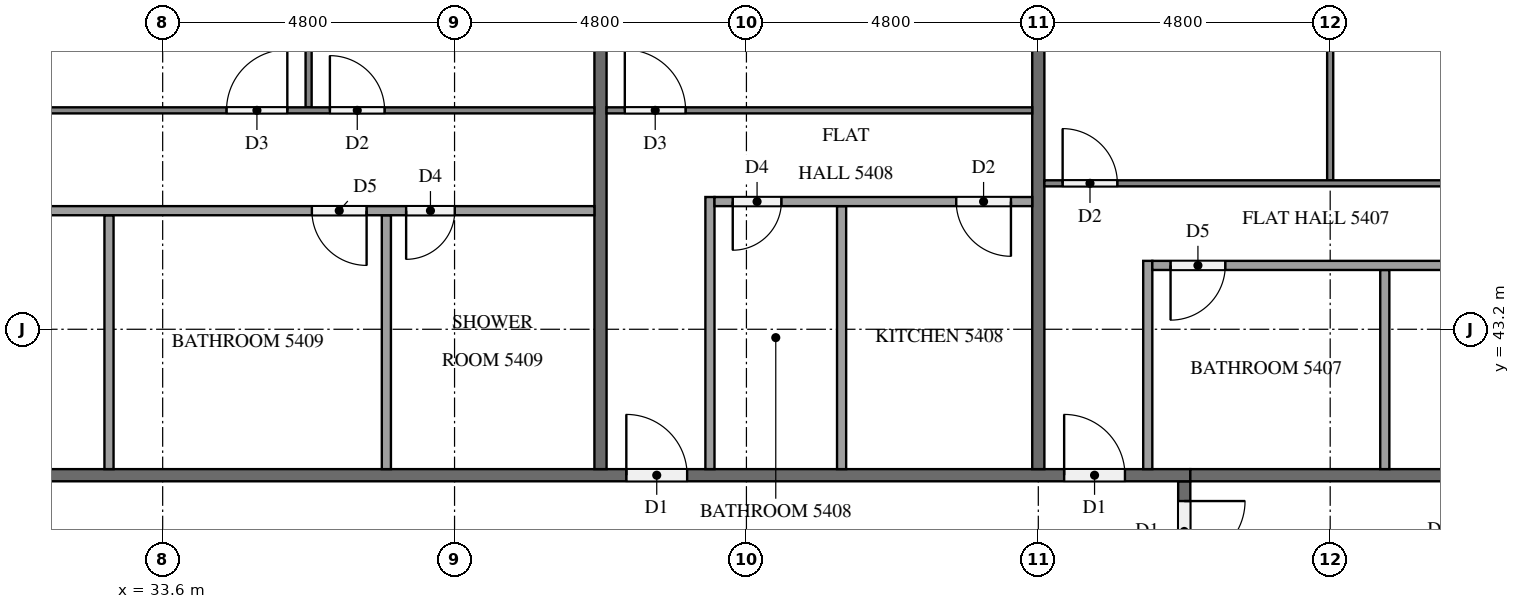
"""IFC4 building model, lengths in metres.
Left out: names, types, materials, properties, quantities, classifications, styles, units other than length and angle.
Written with IfcOpenShell. Run it as: python <this file> out.ifc"""

import sys

from ifc_helpers import new_model, si_unit, direction, frame, frame_2d, origin, place, context, subcontext, project, spatial, rectangle, extrude, element, fill, save


model = new_model("IFC4")
c1 = context("Model", 3, precision=1e-05, world=origin(), true_north=direction((0.0, 1.0)))
c2 = subcontext(c1, "Body", "Model", "MODEL_VIEW")
j1 = project(units=[si_unit("LENGTHUNIT", "METRE"), si_unit("PLANEANGLEUNIT", "RADIAN")], contexts=[c1])
p1 = place(None, origin())
s1 = spatial("IfcSite", under=j1, at=p1, CompositionType="ELEMENT")
p2 = place(p1, origin())
s2 = spatial("IfcBuilding", under=s1, at=p2, CompositionType="ELEMENT")
p3 = place(p2, frame((0.0, 0.0, 208.8)))
s3 = spatial("IfcBuildingStorey", under=s2, at=p3, CompositionType="ELEMENT", Elevation=208.8)
p4 = place(p3, frame((50.4, 40.7, 0.0), z_axis=(0.0, 0.0, 1.0), x_axis=(0.0, -1.0, 0.0)))
e1 = element("IfcWall", 1, at=p4, inside=s3, PredefinedType="PARTITIONING", context=c2, shape_type="SweptSolid", body=[
    extrude(rectangle(XDim=28.6, YDim=0.2, at=frame_2d((14.3, 0.0))), origin(), (0.0, 0.0, 1.0), 3.2),
])
p5 = place(p4, frame((19.525, 0.0, 0.0)))
e2 = element("IfcOpeningElement", 2, at=p5, cuts=e1, PredefinedType="OPENING", context=c2, shape_type="SweptSolid", body=[
    extrude(rectangle(XDim=1.0, YDim=2.1, at=frame_2d((0.5, 1.05))), frame((0.0, 0.11, 0.0), z_axis=(0.0, -1.0, 0.0), x_axis=(1.0, 0.0, 0.0)), (0.0, 0.0, 1.0), 0.22),
])
p6 = place(p4, frame((7.525, 0.0, 0.0)))
e3 = element("IfcOpeningElement", 3, at=p6, cuts=e1, PredefinedType="OPENING", context=c2, shape_type="SweptSolid", body=[
    extrude(rectangle(XDim=1.0, YDim=2.1, at=frame_2d((0.5, 1.05))), frame((0.0, 0.11, 0.0), z_axis=(0.0, -1.0, 0.0), x_axis=(1.0, 0.0, 0.0)), (0.0, 0.0, 1.0), 0.22),
])
p7 = place(p4, frame((0.325, 0.0, 0.0)))
e4 = element("IfcOpeningElement", 4, at=p7, cuts=e1, PredefinedType="OPENING", context=c2, shape_type="SweptSolid", body=[
    extrude(rectangle(XDim=1.0, YDim=2.1, at=frame_2d((0.5, 1.05))), frame((0.0, 0.11, 0.0), z_axis=(0.0, -1.0, 0.0), x_axis=(1.0, 0.0, 0.0)), (0.0, 0.0, 1.0), 0.22),
])
p8 = place(p3, frame((11.9, 40.8, 0.0), z_axis=(0.0, 0.0, 1.0), x_axis=(1.0, 0.0, 0.0)))
e5 = element("IfcWall", 5, at=p8, inside=s3, PredefinedType="PARTITIONING", context=c2, shape_type="SweptSolid", body=[
    extrude(rectangle(XDim=38.6, YDim=0.2, at=frame_2d((19.3, 0.0))), origin(), (0.0, 0.0, 1.0), 3.2),
])
p9 = place(p8, frame((36.525, 0.0, 0.0)))
e6 = element("IfcOpeningElement", 6, at=p9, cuts=e5, PredefinedType="OPENING", context=c2, shape_type="SweptSolid", body=[
    extrude(rectangle(XDim=1.0, YDim=2.1, at=frame_2d((0.5, 1.05))), frame((0.0, 0.11, 0.0), z_axis=(0.0, -1.0, 0.0), x_axis=(1.0, 0.0, 0.0)), (0.0, 0.0, 1.0), 0.22),
])
p10 = place(p8, frame((29.325, 0.0, 0.0)))
e7 = element("IfcOpeningElement", 7, at=p10, cuts=e5, PredefinedType="OPENING", context=c2, shape_type="SweptSolid", body=[
    extrude(rectangle(XDim=1.0, YDim=2.1, at=frame_2d((0.5, 1.05))), frame((0.0, 0.11, 0.0), z_axis=(0.0, -1.0, 0.0), x_axis=(1.0, 0.0, 0.0)), (0.0, 0.0, 1.0), 0.22),
])
p11 = place(p8, frame((12.525, 0.0, 0.0)))
e8 = element("IfcOpeningElement", 8, at=p11, cuts=e5, PredefinedType="OPENING", context=c2, shape_type="SweptSolid", body=[
    extrude(rectangle(XDim=1.0, YDim=2.1, at=frame_2d((0.5, 1.05))), frame((0.0, 0.11, 0.0), z_axis=(0.0, -1.0, 0.0), x_axis=(1.0, 0.0, 0.0)), (0.0, 0.0, 1.0), 0.22),
])
p12 = place(p8, frame((10.625, 0.0, 0.0)))
e9 = element("IfcOpeningElement", 9, at=p12, cuts=e5, PredefinedType="OPENING", context=c2, shape_type="SweptSolid", body=[
    extrude(rectangle(XDim=1.1, YDim=2.1, at=frame_2d((0.55, 1.05))), frame((0.0, 0.11, 0.0), z_axis=(0.0, -1.0, 0.0), x_axis=(1.0, 0.0, 0.0)), (0.0, 0.0, 1.0), 0.22),
])
p13 = place(p3, frame((50.5, 40.8, 0.0), z_axis=(0.0, 0.0, 1.0), x_axis=(1.0, 0.0, 0.0)))
e10 = element("IfcWall", 10, at=p13, inside=s3, PredefinedType="PARTITIONING", context=c2, shape_type="SweptSolid", body=[
    extrude(rectangle(XDim=11.8, YDim=0.2, at=frame_2d((5.9, 0.0))), origin(), (0.0, 0.0, 1.0), 3.2),
])
p14 = place(p3, frame((48.0, 52.475, 0.0), z_axis=(0.0, 0.0, 1.0), x_axis=(0.0, -1.0, 0.0)))
e11 = element("IfcWall", 11, at=p14, inside=s3, PredefinedType="PARTITIONING", context=c2, shape_type="SweptSolid", body=[
    extrude(rectangle(XDim=11.575, YDim=0.2, at=frame_2d((5.788, 0.0))), origin(), (0.0, 0.0, 1.0), 3.2),
])
p15 = place(p3, frame((40.8, 52.7, 0.0), z_axis=(0.0, 0.0, 1.0), x_axis=(0.0, -1.0, 0.0)))
e12 = element("IfcWall", 12, at=p15, inside=s3, PredefinedType="PARTITIONING", context=c2, shape_type="SweptSolid", body=[
    extrude(rectangle(XDim=11.8, YDim=0.2, at=frame_2d((5.9, 0.0))), origin(), (0.0, 0.0, 1.0), 3.2),
])
p16 = place(p3, frame((52.8, 45.65, 0.0), z_axis=(0.0, 0.0, 1.0), x_axis=(0.0, 1.0, 0.0)))
e13 = element("IfcWall", 13, at=p16, inside=s3, PredefinedType="PARTITIONING", context=c2, shape_type="SweptSolid", body=[
    extrude(rectangle(XDim=7.05, YDim=0.1, at=frame_2d((3.525, 0.0))), origin(), (0.0, 0.0, 1.0), 3.2),
])
p17 = place(p3, frame((48.1, 45.6, 0.0), z_axis=(0.0, 0.0, 1.0), x_axis=(1.0, 0.0, 0.0)))
e14 = element("IfcWall", 14, at=p17, inside=s3, PredefinedType="PARTITIONING", context=c2, shape_type="SweptSolid", body=[
    extrude(rectangle(XDim=14.2, YDim=0.1, at=frame_2d((7.1, 0.0))), origin(), (0.0, 0.0, 1.0), 3.2),
])
p18 = place(p17, frame((0.3, 0.0, 0.0)))
e15 = element("IfcOpeningElement", 15, at=p18, cuts=e14, PredefinedType="OPENING", context=c2, shape_type="SweptSolid", body=[
    extrude(rectangle(XDim=0.9, YDim=2.1, at=frame_2d((0.45, 1.05))), frame((0.0, 0.06, 0.0), z_axis=(0.0, -1.0, 0.0), x_axis=(1.0, 0.0, 0.0)), (0.0, 0.0, 1.0), 0.12),
])
p19 = place(p17, frame((8.25, 0.0, 0.0)))
e16 = element("IfcOpeningElement", 16, at=p19, cuts=e14, PredefinedType="OPENING", context=c2, shape_type="SweptSolid", body=[
    extrude(rectangle(XDim=0.9, YDim=2.1, at=frame_2d((0.45, 1.05))), frame((0.0, 0.06, 0.0), z_axis=(0.0, -1.0, 0.0), x_axis=(1.0, 0.0, 0.0)), (0.0, 0.0, 1.0), 0.12),
])
p20 = place(p17, frame((9.85, 0.0, 0.0)))
e17 = element("IfcOpeningElement", 17, at=p20, cuts=e14, PredefinedType="OPENING", context=c2, shape_type="SweptSolid", body=[
    extrude(rectangle(XDim=1.0, YDim=2.1, at=frame_2d((0.5, 1.05))), frame((0.0, 0.06, 0.0), z_axis=(0.0, -1.0, 0.0), x_axis=(1.0, 0.0, 0.0)), (0.0, 0.0, 1.0), 0.12),
])
p21 = place(p3, frame((53.698, 40.9, 0.0), z_axis=(0.0, 0.0, 1.0), x_axis=(0.0, 1.0, 0.0)))
e18 = element("IfcWall", 18, at=p21, inside=s3, PredefinedType="PARTITIONING", context=c2, shape_type="SweptSolid", body=[
    extrude(rectangle(XDim=3.275, YDim=0.15, at=frame_2d((1.638, 0.0))), origin(), (0.0, 0.0, 1.0), 3.2),
])
p22 = place(p3, frame((49.8, 40.9, 0.0), z_axis=(0.0, 0.0, 1.0), x_axis=(0.0, 1.0, 0.0)))
e19 = element("IfcWall", 19, at=p22, inside=s3, PredefinedType="PARTITIONING", context=c2, shape_type="SweptSolid", body=[
    extrude(rectangle(XDim=3.425, YDim=0.15, at=frame_2d((1.712, 0.0))), origin(), (0.0, 0.0, 1.0), 3.2),
])
p23 = place(p3, frame((62.3, 44.25, 0.0), z_axis=(0.0, 0.0, 1.0), x_axis=(-1.0, 0.0, 0.0)))
e20 = element("IfcWall", 20, at=p23, inside=s3, PredefinedType="PARTITIONING", context=c2, shape_type="SweptSolid", body=[
    extrude(rectangle(XDim=12.425, YDim=0.15, at=frame_2d((6.212, 0.0))), origin(), (0.0, 0.0, 1.0), 3.2),
])
p24 = place(p23, frame((11.225, 0.0, 0.0)))
e21 = element("IfcOpeningElement", 21, at=p24, cuts=e20, PredefinedType="OPENING", context=c2, shape_type="SweptSolid", body=[
    extrude(rectangle(XDim=0.9, YDim=2.1, at=frame_2d((0.45, 1.05))), frame((0.0, 0.085, 0.0), z_axis=(0.0, -1.0, 0.0), x_axis=(1.0, 0.0, 0.0)), (0.0, 0.0, 1.0), 0.17),
])
p25 = place(p23, frame((3.192, 0.0, 0.0)))
e22 = element("IfcOpeningElement", 22, at=p25, cuts=e20, PredefinedType="OPENING", context=c2, shape_type="SweptSolid", body=[
    extrude(rectangle(XDim=0.9, YDim=2.1, at=frame_2d((0.45, 1.05))), frame((0.0, 0.085, 0.0), z_axis=(0.0, -1.0, 0.0), x_axis=(1.0, 0.0, 0.0)), (0.0, 0.0, 1.0), 0.17),
])
p26 = place(p23, frame((1.742, 0.0, 0.0)))
e23 = element("IfcOpeningElement", 23, at=p26, cuts=e20, PredefinedType="OPENING", context=c2, shape_type="SweptSolid", body=[
    extrude(rectangle(XDim=0.8, YDim=2.1, at=frame_2d((0.4, 1.05))), frame((0.0, 0.085, 0.0), z_axis=(0.0, -1.0, 0.0), x_axis=(1.0, 0.0, 0.0)), (0.0, 0.0, 1.0), 0.17),
])
p27 = place(p3, frame((40.9, 46.8, 0.0), z_axis=(0.0, 0.0, 1.0), x_axis=(1.0, 0.0, 0.0)))
e24 = element("IfcWall", 24, at=p27, inside=s3, PredefinedType="PARTITIONING", context=c2, shape_type="SweptSolid", body=[
    extrude(rectangle(XDim=7.0, YDim=0.1, at=frame_2d((3.5, 0.0))), origin(), (0.0, 0.0, 1.0), 3.2),
])
p28 = place(p27, frame((0.3, 0.0, 0.0)))
e25 = element("IfcOpeningElement", 25, at=p28, cuts=e24, PredefinedType="OPENING", context=c2, shape_type="SweptSolid", body=[
    extrude(rectangle(XDim=1.0, YDim=2.1, at=frame_2d((0.5, 1.05))), frame((0.0, 0.06, 0.0), z_axis=(0.0, -1.0, 0.0), x_axis=(1.0, 0.0, 0.0)), (0.0, 0.0, 1.0), 0.12),
])
p29 = place(p3, frame((44.765, 40.9, 0.0), z_axis=(0.0, 0.0, 1.0), x_axis=(0.0, 1.0, 0.0)))
e26 = element("IfcWall", 26, at=p29, inside=s3, PredefinedType="PARTITIONING", context=c2, shape_type="SweptSolid", body=[
    extrude(rectangle(XDim=4.325, YDim=0.15, at=frame_2d((2.163, 0.0))), origin(), (0.0, 0.0, 1.0), 3.2),
])
p30 = place(p3, frame((42.6, 40.9, 0.0), z_axis=(0.0, 0.0, 1.0), x_axis=(0.0, 1.0, 0.0)))
e27 = element("IfcWall", 27, at=p30, inside=s3, PredefinedType="PARTITIONING", context=c2, shape_type="SweptSolid", body=[
    extrude(rectangle(XDim=4.475, YDim=0.15, at=frame_2d((2.238, 0.0))), origin(), (0.0, 0.0, 1.0), 3.2),
])
p31 = place(p3, frame((47.9, 45.3, 0.0), z_axis=(0.0, 0.0, 1.0), x_axis=(-1.0, 0.0, 0.0)))
e28 = element("IfcWall", 28, at=p31, inside=s3, PredefinedType="PARTITIONING", context=c2, shape_type="SweptSolid", body=[
    extrude(rectangle(XDim=5.225, YDim=0.15, at=frame_2d((2.612, 0.0))), origin(), (0.0, 0.0, 1.0), 3.2),
])
p32 = place(p31, frame((4.125, 0.0, 0.0)))
e29 = element("IfcOpeningElement", 29, at=p32, cuts=e28, PredefinedType="OPENING", context=c2, shape_type="SweptSolid", body=[
    extrude(rectangle(XDim=0.8, YDim=2.1, at=frame_2d((0.4, 1.05))), frame((0.0, 0.085, 0.0), z_axis=(0.0, -1.0, 0.0), x_axis=(1.0, 0.0, 0.0)), (0.0, 0.0, 1.0), 0.17),
])
p33 = place(p31, frame((0.35, 0.0, 0.0)))
e30 = element("IfcOpeningElement", 30, at=p33, cuts=e28, PredefinedType="OPENING", context=c2, shape_type="SweptSolid", body=[
    extrude(rectangle(XDim=0.9, YDim=2.1, at=frame_2d((0.45, 1.05))), frame((0.0, 0.085, 0.0), z_axis=(0.0, -1.0, 0.0), x_axis=(1.0, 0.0, 0.0)), (0.0, 0.0, 1.0), 0.17),
])
p34 = place(p3, frame((36.0, 46.85, 0.0), z_axis=(0.0, 0.0, 1.0), x_axis=(0.0, 1.0, 0.0)))
e31 = element("IfcWall", 31, at=p34, inside=s3, PredefinedType="PARTITIONING", context=c2, shape_type="SweptSolid", body=[
    extrude(rectangle(XDim=5.85, YDim=0.1, at=frame_2d((2.925, 0.0))), origin(), (0.0, 0.0, 1.0), 3.2),
])
p35 = place(p3, frame((24.1, 46.8, 0.0), z_axis=(0.0, 0.0, 1.0), x_axis=(1.0, 0.0, 0.0)))
e32 = element("IfcWall", 32, at=p35, inside=s3, PredefinedType="PARTITIONING", context=c2, shape_type="SweptSolid", body=[
    extrude(rectangle(XDim=16.6, YDim=0.1, at=frame_2d((8.3, 0.0))), origin(), (0.0, 0.0, 1.0), 3.2),
])
p36 = place(p35, frame((0.3, 0.0, 0.0)))
e33 = element("IfcOpeningElement", 33, at=p36, cuts=e32, PredefinedType="OPENING", context=c2, shape_type="SweptSolid", body=[
    extrude(rectangle(XDim=0.9, YDim=2.1, at=frame_2d((0.45, 1.05))), frame((0.0, 0.06, 0.0), z_axis=(0.0, -1.0, 0.0), x_axis=(1.0, 0.0, 0.0)), (0.0, 0.0, 1.0), 0.12),
])
p37 = place(p35, frame((10.55, 0.0, 0.0)))
e34 = element("IfcOpeningElement", 34, at=p37, cuts=e32, PredefinedType="OPENING", context=c2, shape_type="SweptSolid", body=[
    extrude(rectangle(XDim=1.0, YDim=2.1, at=frame_2d((0.5, 1.05))), frame((0.0, 0.06, 0.0), z_axis=(0.0, -1.0, 0.0), x_axis=(1.0, 0.0, 0.0)), (0.0, 0.0, 1.0), 0.12),
])
p38 = place(p35, frame((12.25, 0.0, 0.0)))
e35 = element("IfcOpeningElement", 35, at=p38, cuts=e32, PredefinedType="OPENING", context=c2, shape_type="SweptSolid", body=[
    extrude(rectangle(XDim=0.9, YDim=2.1, at=frame_2d((0.45, 1.05))), frame((0.0, 0.06, 0.0), z_axis=(0.0, -1.0, 0.0), x_axis=(1.0, 0.0, 0.0)), (0.0, 0.0, 1.0), 0.12),
])
for number, where, z_axis, x_axis in (
    (36, (32.717, 40.9, 0.0), (0.0, 0.0, 1.0), (0.0, 1.0, 0.0)),
    (37, (37.279, 40.9, 0.0), (0.0, 0.0, 1.0), (0.0, 1.0, 0.0)),
):
    element("IfcWall", number, at=place(p3, frame(where, z_axis=z_axis, x_axis=x_axis)), inside=s3, PredefinedType="PARTITIONING", context=c2, shape_type="SweptSolid", body=[
        extrude(rectangle(XDim=4.175, YDim=0.15, at=frame_2d((2.087, 0.0))), origin(), (0.0, 0.0, 1.0), 3.2),
    ])
p39 = place(p3, frame((40.7, 45.15, 0.0), z_axis=(0.0, 0.0, 1.0), x_axis=(-1.0, 0.0, 0.0)))
e38 = element("IfcWall", 38, at=p39, inside=s3, PredefinedType="PARTITIONING", context=c2, shape_type="SweptSolid", body=[
    extrude(rectangle(XDim=14.825, YDim=0.15, at=frame_2d((7.413, 0.0))), origin(), (0.0, 0.0, 1.0), 3.2),
])
p40 = place(p39, frame((13.625, 0.0, 0.0)))
e39 = element("IfcOpeningElement", 39, at=p40, cuts=e38, PredefinedType="OPENING", context=c2, shape_type="SweptSolid", body=[
    extrude(rectangle(XDim=0.9, YDim=2.1, at=frame_2d((0.45, 1.05))), frame((0.0, 0.085, 0.0), z_axis=(0.0, -1.0, 0.0), x_axis=(1.0, 0.0, 0.0)), (0.0, 0.0, 1.0), 0.17),
])
p41 = place(p39, frame((3.746, 0.0, 0.0)))
e40 = element("IfcOpeningElement", 40, at=p41, cuts=e38, PredefinedType="OPENING", context=c2, shape_type="SweptSolid", body=[
    extrude(rectangle(XDim=0.9, YDim=2.1, at=frame_2d((0.45, 1.05))), frame((0.0, 0.085, 0.0), z_axis=(0.0, -1.0, 0.0), x_axis=(1.0, 0.0, 0.0)), (0.0, 0.0, 1.0), 0.17),
])
p42 = place(p39, frame((2.296, 0.0, 0.0)))
e41 = element("IfcOpeningElement", 41, at=p42, cuts=e38, PredefinedType="OPENING", context=c2, shape_type="SweptSolid", body=[
    extrude(rectangle(XDim=0.8, YDim=2.1, at=frame_2d((0.4, 1.05))), frame((0.0, 0.085, 0.0), z_axis=(0.0, -1.0, 0.0), x_axis=(1.0, 0.0, 0.0)), (0.0, 0.0, 1.0), 0.17),
])
p43 = place(p7, origin())
e42 = element("IfcDoor", 42, at=p43, inside=s3, OperationType="SINGLE_SWING_LEFT", PredefinedType="DOOR", context=c2, shape_type="SweptSolid", body=[
    extrude(rectangle(XDim=1.0, YDim=2.1, at=frame_2d((0.5, 1.05))), frame((0.0, 0.025, 0.0), z_axis=(0.0, -1.0, 0.0), x_axis=(1.0, 0.0, 0.0)), (0.0, 0.0, 1.0), 0.05),
])
fill(e4, e42)
p44 = place(p9, origin())
e43 = element("IfcDoor", 43, at=p44, inside=s3, OperationType="SINGLE_SWING_LEFT", PredefinedType="DOOR", context=c2, shape_type="SweptSolid", body=[
    extrude(rectangle(XDim=1.0, YDim=2.1, at=frame_2d((0.5, 1.05))), frame((0.0, 0.025, 0.0), z_axis=(0.0, -1.0, 0.0), x_axis=(1.0, 0.0, 0.0)), (0.0, 0.0, 1.0), 0.05),
])
fill(e6, e43)
p45 = place(p10, origin())
e44 = element("IfcDoor", 44, at=p45, inside=s3, OperationType="SINGLE_SWING_LEFT", PredefinedType="DOOR", context=c2, shape_type="SweptSolid", body=[
    extrude(rectangle(XDim=1.0, YDim=2.1, at=frame_2d((0.5, 1.05))), frame((0.0, 0.025, 0.0), z_axis=(0.0, -1.0, 0.0), x_axis=(1.0, 0.0, 0.0)), (0.0, 0.0, 1.0), 0.05),
])
fill(e7, e44)
p46 = place(p18, origin())
e45 = element("IfcDoor", 45, at=p46, inside=s3, OperationType="SINGLE_SWING_LEFT", PredefinedType="DOOR", context=c2, shape_type="SweptSolid", body=[
    extrude(rectangle(XDim=0.9, YDim=2.1, at=frame_2d((0.45, 1.05))), frame((0.0, 0.025, 0.0), z_axis=(0.0, -1.0, 0.0), x_axis=(1.0, 0.0, 0.0)), (0.0, 0.0, 1.0), 0.05),
])
fill(e15, e45)
p47 = place(p24, origin())
e46 = element("IfcDoor", 46, at=p47, inside=s3, OperationType="SINGLE_SWING_RIGHT", PredefinedType="DOOR", context=c2, shape_type="SweptSolid", body=[
    extrude(rectangle(XDim=0.9, YDim=2.1, at=frame_2d((0.45, 1.05))), frame((0.0, 0.025, 0.0), z_axis=(0.0, -1.0, 0.0), x_axis=(1.0, 0.0, 0.0)), (0.0, 0.0, 1.0), 0.05),
])
fill(e21, e46)
p48 = place(p28, origin())
e47 = element("IfcDoor", 47, at=p48, inside=s3, OperationType="SINGLE_SWING_LEFT", PredefinedType="DOOR", context=c2, shape_type="SweptSolid", body=[
    extrude(rectangle(XDim=1.0, YDim=2.1, at=frame_2d((0.5, 1.05))), frame((0.0, 0.025, 0.0), z_axis=(0.0, -1.0, 0.0), x_axis=(1.0, 0.0, 0.0)), (0.0, 0.0, 1.0), 0.05),
])
fill(e25, e47)
p49 = place(p32, origin())
e48 = element("IfcDoor", 48, at=p49, inside=s3, OperationType="SINGLE_SWING_RIGHT", PredefinedType="DOOR", context=c2, shape_type="SweptSolid", body=[
    extrude(rectangle(XDim=0.8, YDim=2.1, at=frame_2d((0.4, 1.05))), frame((0.0, 0.025, 0.0), z_axis=(0.0, -1.0, 0.0), x_axis=(1.0, 0.0, 0.0)), (0.0, 0.0, 1.0), 0.05),
])
fill(e29, e48)
p50 = place(p33, origin())
e49 = element("IfcDoor", 49, at=p50, inside=s3, OperationType="SINGLE_SWING_LEFT", PredefinedType="DOOR", context=c2, shape_type="SweptSolid", body=[
    extrude(rectangle(XDim=0.9, YDim=2.1, at=frame_2d((0.45, 1.05))), frame((0.0, 0.025, 0.0), z_axis=(0.0, -1.0, 0.0), x_axis=(1.0, 0.0, 0.0)), (0.0, 0.0, 1.0), 0.05),
])
fill(e30, e49)
p51 = place(p37, origin())
e50 = element("IfcDoor", 50, at=p51, inside=s3, OperationType="SINGLE_SWING_RIGHT", PredefinedType="DOOR", context=c2, shape_type="SweptSolid", body=[
    extrude(rectangle(XDim=1.0, YDim=2.1, at=frame_2d((0.5, 1.05))), frame((0.0, 0.025, 0.0), z_axis=(0.0, -1.0, 0.0), x_axis=(1.0, 0.0, 0.0)), (0.0, 0.0, 1.0), 0.05),
])
fill(e34, e50)
p52 = place(p38, origin())
e51 = element("IfcDoor", 51, at=p52, inside=s3, OperationType="SINGLE_SWING_LEFT", PredefinedType="DOOR", context=c2, shape_type="SweptSolid", body=[
    extrude(rectangle(XDim=0.9, YDim=2.1, at=frame_2d((0.45, 1.05))), frame((0.0, 0.025, 0.0), z_axis=(0.0, -1.0, 0.0), x_axis=(1.0, 0.0, 0.0)), (0.0, 0.0, 1.0), 0.05),
])
fill(e35, e51)
p53 = place(p41, origin())
e52 = element("IfcDoor", 52, at=p53, inside=s3, OperationType="SINGLE_SWING_LEFT", PredefinedType="DOOR", context=c2, shape_type="SweptSolid", body=[
    extrude(rectangle(XDim=0.9, YDim=2.1, at=frame_2d((0.45, 1.05))), frame((0.0, 0.025, 0.0), z_axis=(0.0, -1.0, 0.0), x_axis=(1.0, 0.0, 0.0)), (0.0, 0.0, 1.0), 0.05),
])
fill(e40, e52)
p54 = place(p42, origin())
e53 = element("IfcDoor", 53, at=p54, inside=s3, OperationType="SINGLE_SWING_RIGHT", PredefinedType="DOOR", context=c2, shape_type="SweptSolid", body=[
    extrude(rectangle(XDim=0.8, YDim=2.1, at=frame_2d((0.4, 1.05))), frame((0.0, 0.025, 0.0), z_axis=(0.0, -1.0, 0.0), x_axis=(1.0, 0.0, 0.0)), (0.0, 0.0, 1.0), 0.05),
])
fill(e41, e53)
save(model, sys.argv[1])
